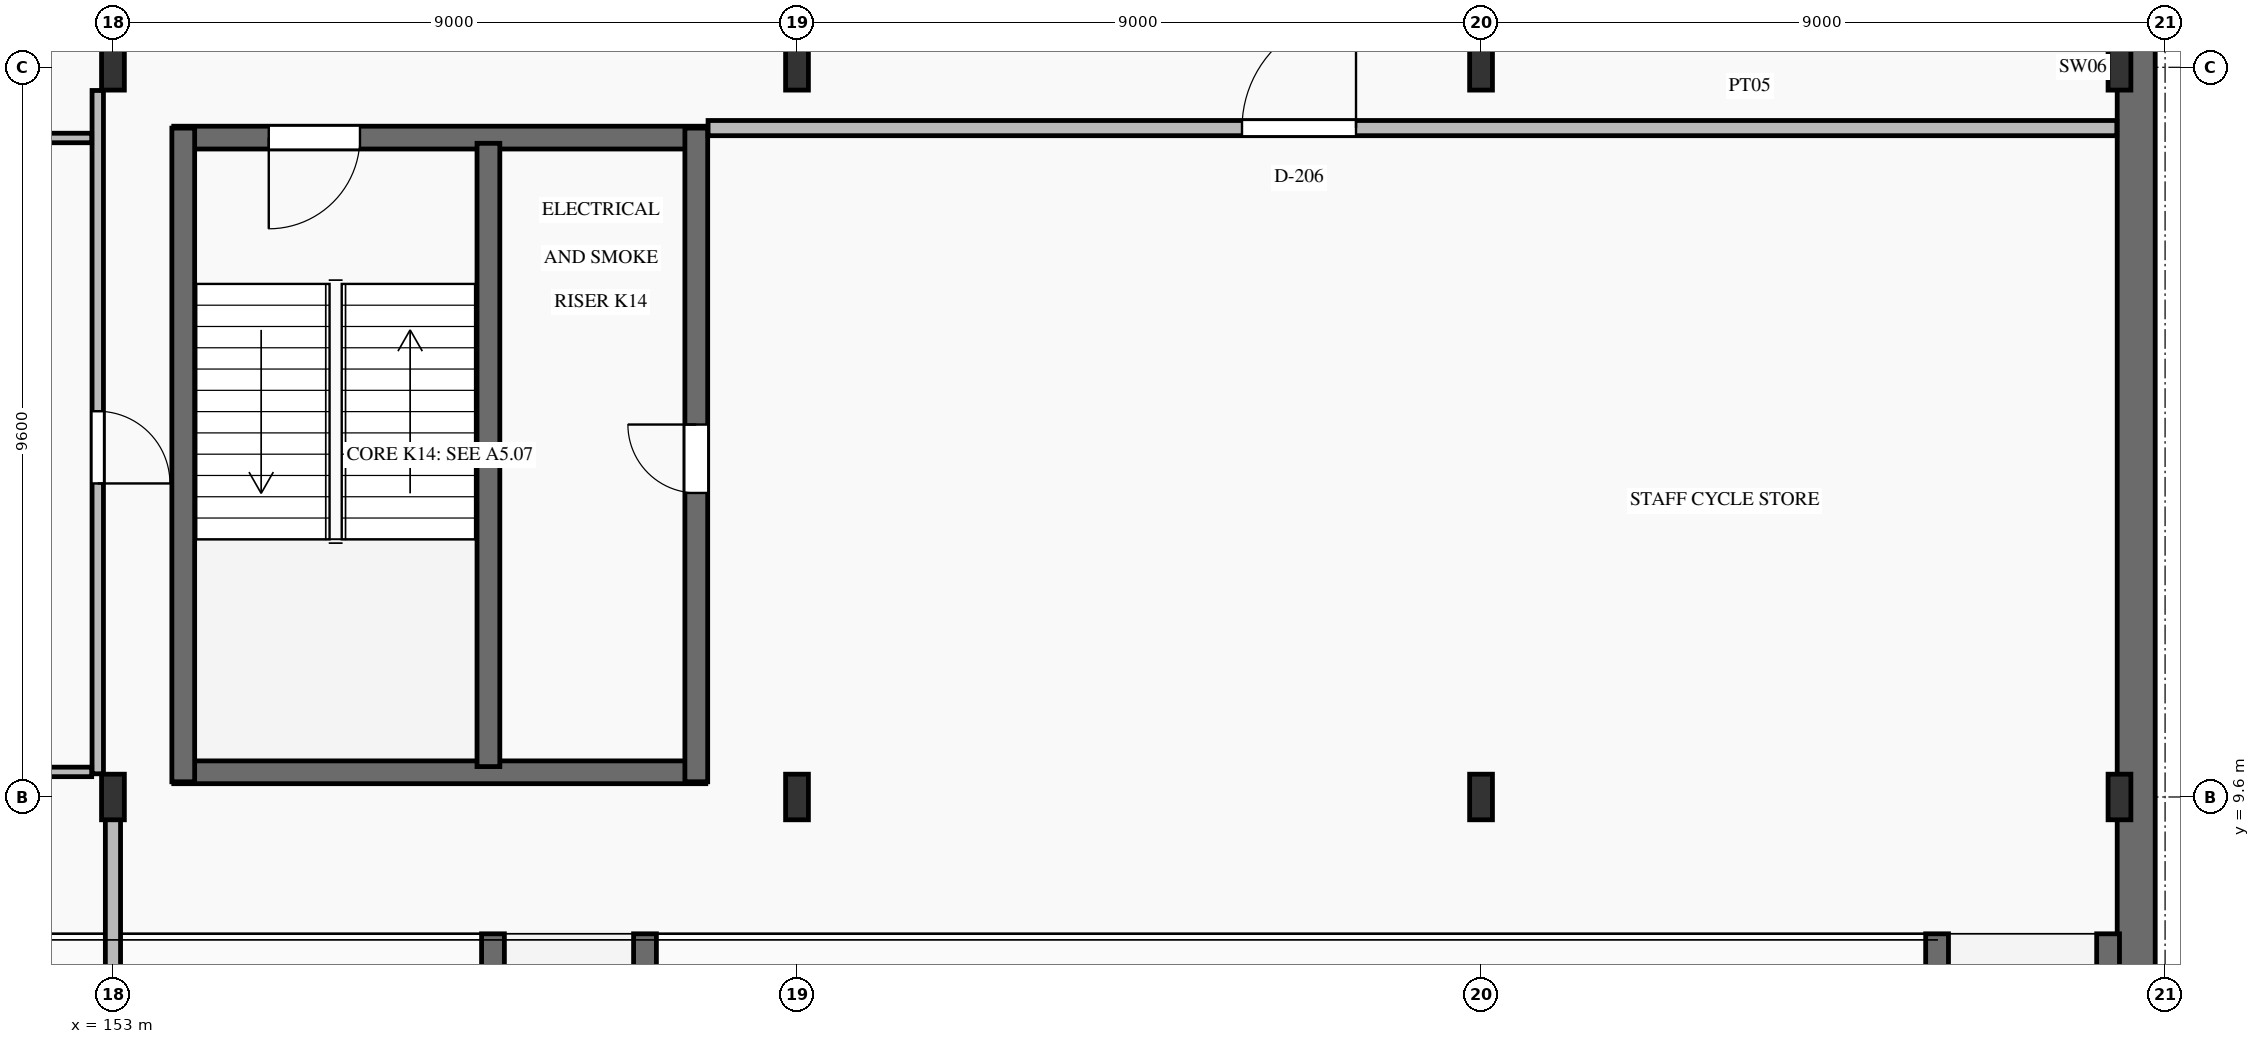
"""IFC4 building model, lengths in metres.
Left out: names, types, materials, properties, quantities, classifications, styles, units other than length and angle.
Written with IfcOpenShell. Run it as: python <this file> out.ifc"""

import sys

from ifc_helpers import new_model, si_unit, direction, frame, frame_2d, origin, origin_2d, place, context, subcontext, project, spatial, rectangle, i_section, extrude, element, fill, save


model = new_model("IFC4")
c1 = context("Model", 3, precision=1e-05, world=origin(), true_north=direction((0.0, 1.0)))
c2 = subcontext(c1, "Body", "Model", "MODEL_VIEW")
j1 = project(units=[si_unit("LENGTHUNIT", "METRE"), si_unit("PLANEANGLEUNIT", "RADIAN")], contexts=[c1])
p1 = place(None, origin())
s1 = spatial("IfcSite", under=j1, at=p1, CompositionType="ELEMENT")
p2 = place(p1, origin())
s2 = spatial("IfcBuilding", under=s1, at=p2, CompositionType="ELEMENT")
p3 = place(p2, frame((0.0, 0.0, -4.5)))
s3 = spatial("IfcBuildingStorey", under=s2, at=p3, CompositionType="ELEMENT", Elevation=-4.5)
for number, where, z_axis, x_axis in (
    (1, (153.0, 9.6, 0.0), (0.0, 0.0, 1.0), (1.0, 0.0, 0.0)),
    (2, (153.0, 19.2, 0.0), (0.0, 0.0, 1.0), (1.0, 0.0, 0.0)),
    (3, (162.0, 9.6, 0.0), (0.0, 0.0, 1.0), (1.0, 0.0, 0.0)),
    (4, (162.0, 19.2, 0.0), (0.0, 0.0, 1.0), (1.0, 0.0, 0.0)),
    (5, (171.0, 9.6, 0.0), (0.0, 0.0, 1.0), (1.0, 0.0, 0.0)),
    (6, (171.0, 19.2, 0.0), (0.0, 0.0, 1.0), (1.0, 0.0, 0.0)),
    (7, (179.4, 9.6, 0.0), (0.0, 0.0, 1.0), (1.0, 0.0, 0.0)),
    (8, (179.4, 19.2, 0.0), (0.0, 0.0, 1.0), (1.0, 0.0, 0.0)),
):
    element("IfcColumn", number, at=place(p3, frame(where, z_axis=z_axis, x_axis=x_axis)), inside=s3, PredefinedType="COLUMN", context=c2, shape_type="SweptSolid", body=[
        extrude(i_section(OverallWidth=0.3, OverallDepth=0.6, WebThickness=0.015, FlangeThickness=0.03, FilletRadius=0.027, at=origin_2d()), origin(), (0.0, 0.0, 1.0), 4.5),
    ])
p4 = place(p3, frame((179.62, 0.22, 0.0), z_axis=(0.0, 0.0, 1.0), x_axis=(0.0, 1.0, 0.0)))
e9 = element("IfcWall", 9, at=p4, inside=s3, PredefinedType="SHEAR", context=c2, shape_type="SweptSolid", body=[
    extrude(rectangle(XDim=37.96, YDim=0.5, at=frame_2d((18.98, 0.0))), origin(), (0.0, 0.0, 1.0), 4.2),
])
p5 = place(p3, frame((153.8, 9.925, 0.0), z_axis=(0.0, 0.0, 1.0), x_axis=(1.0, 0.0, 0.0)))
e10 = element("IfcWall", 10, at=p5, inside=s3, PredefinedType="SHEAR", context=c2, shape_type="SweptSolid", body=[
    extrude(rectangle(XDim=7.0, YDim=0.3, at=frame_2d((3.5, 0.0))), origin(), (0.0, 0.0, 1.0), 4.5),
])
p6 = place(p3, frame((153.8, 18.275, 0.0), z_axis=(0.0, 0.0, 1.0), x_axis=(1.0, 0.0, 0.0)))
e11 = element("IfcWall", 11, at=p6, inside=s3, PredefinedType="SHEAR", context=c2, shape_type="SweptSolid", body=[
    extrude(rectangle(XDim=7.0, YDim=0.3, at=frame_2d((3.5, 0.0))), origin(), (0.0, 0.0, 1.0), 4.5),
])
p7 = place(p6, frame((1.25, 0.0, 0.0)))
e12 = element("IfcOpeningElement", 12, at=p7, cuts=e11, PredefinedType="OPENING", context=c2, shape_type="SweptSolid", body=[
    extrude(rectangle(XDim=1.2, YDim=2.15, at=frame_2d((0.6, 1.075))), frame((0.0, 0.165, 0.0), z_axis=(0.0, -1.0, 0.0), x_axis=(1.0, 0.0, 0.0)), (0.0, 0.0, 1.0), 0.33),
])
p8 = place(p3, frame((153.925, 9.8, 0.0), z_axis=(0.0, 0.0, 1.0), x_axis=(0.0, 1.0, 0.0)))
e13 = element("IfcWall", 13, at=p8, inside=s3, PredefinedType="SHEAR", context=c2, shape_type="SweptSolid", body=[
    extrude(rectangle(XDim=8.6, YDim=0.3, at=frame_2d((4.3, 0.0))), origin(), (0.0, 0.0, 1.0), 4.5),
])
p9 = place(p3, frame((160.675, 9.8, 0.0), z_axis=(0.0, 0.0, 1.0), x_axis=(0.0, 1.0, 0.0)))
e14 = element("IfcWall", 14, at=p9, inside=s3, PredefinedType="SHEAR", context=c2, shape_type="SweptSolid", body=[
    extrude(rectangle(XDim=8.6, YDim=0.3, at=frame_2d((4.3, 0.0))), origin(), (0.0, 0.0, 1.0), 4.5),
])
p10 = place(p9, frame((3.8, 0.0, 0.0)))
e15 = element("IfcOpeningElement", 15, at=p10, cuts=e14, PredefinedType="OPENING", context=c2, shape_type="SweptSolid", body=[
    extrude(rectangle(XDim=0.9, YDim=2.05, at=frame_2d((0.45, 1.025))), frame((0.0, 0.165, 0.0), z_axis=(0.0, -1.0, 0.0), x_axis=(1.0, 0.0, 0.0)), (0.0, 0.0, 1.0), 0.33),
])
p11 = place(p3, frame((157.94, 10.0, 0.0), z_axis=(0.0, 0.0, 1.0), x_axis=(0.0, 1.0, 0.0)))
e16 = element("IfcWall", 16, at=p11, inside=s3, PredefinedType="SHEAR", context=c2, shape_type="SweptSolid", body=[
    extrude(rectangle(XDim=8.2, YDim=0.3, at=frame_2d((4.1, 0.0))), origin(), (0.0, 0.0, 1.0), 4.5),
])
for number, where, z_axis, x_axis in (
    (17, (158.0, 2.2, 0.0), (0.0, 0.0, 1.0), (0.0, 1.0, 0.0)),
    (18, (160.0, 2.2, 0.0), (0.0, 0.0, 1.0), (0.0, 1.0, 0.0)),
):
    element("IfcWall", number, at=place(p3, frame(where, z_axis=z_axis, x_axis=x_axis)), inside=s3, PredefinedType="SHEAR", context=c2, shape_type="SweptSolid", body=[
        extrude(rectangle(XDim=5.6, YDim=0.3, at=frame_2d((2.8, 0.0))), origin(), (0.0, 0.0, 1.0), 1.95),
    ])
for number, where, z_axis, x_axis in (
    (19, (177.0, 2.2, 0.0), (0.0, 0.0, 1.0), (0.0, 1.0, 0.0)),
    (20, (179.25, 2.2, 0.0), (0.0, 0.0, 1.0), (0.0, 1.0, 0.0)),
):
    element("IfcWall", number, at=place(p3, frame(where, z_axis=z_axis, x_axis=x_axis)), inside=s3, PredefinedType="SHEAR", context=c2, shape_type="SweptSolid", body=[
        extrude(rectangle(XDim=5.6, YDim=0.3, at=frame_2d((2.8, 0.0))), origin(), (0.0, 0.0, 1.0), 4.2),
    ])
p12 = place(p3, frame((160.83, 18.4, 0.0), z_axis=(0.0, 0.0, 1.0), x_axis=(1.0, 0.0, 0.0)))
e21 = element("IfcWall", 21, at=p12, inside=s3, PredefinedType="PARTITIONING", context=c2, shape_type="SweptSolid", body=[
    extrude(rectangle(XDim=18.535, YDim=0.2, at=frame_2d((9.268, 0.0))), origin(), (0.0, 0.0, 1.0), 4.2),
])
p13 = place(p12, frame((7.025, 0.0, 0.0)))
e22 = element("IfcOpeningElement", 22, at=p13, cuts=e21, PredefinedType="OPENING", context=c2, shape_type="SweptSolid", body=[
    extrude(rectangle(XDim=1.5, YDim=2.25, at=frame_2d((0.75, 1.125))), frame((0.0, 0.115, 0.0), z_axis=(0.0, -1.0, 0.0), x_axis=(1.0, 0.0, 0.0)), (0.0, 0.0, 1.0), 0.23),
])
p14 = place(p3, frame((152.8, 9.905, 0.0), z_axis=(0.0, 0.0, 1.0), x_axis=(0.0, 1.0, 0.0)))
e23 = element("IfcWall", 23, at=p14, inside=s3, PredefinedType="PARTITIONING", context=c2, shape_type="SweptSolid", body=[
    extrude(rectangle(XDim=8.99, YDim=0.15, at=frame_2d((4.495, 0.0))), origin(), (0.0, 0.0, 1.0), 3.66),
])
p15 = place(p14, frame((3.82, 0.0, 0.0)))
e24 = element("IfcOpeningElement", 24, at=p15, cuts=e23, PredefinedType="OPENING", context=c2, shape_type="SweptSolid", body=[
    extrude(rectangle(XDim=0.95, YDim=2.1, at=frame_2d((0.475, 1.05))), frame((0.0, 0.09, 0.0), z_axis=(0.0, -1.0, 0.0), x_axis=(1.0, 0.0, 0.0)), (0.0, 0.0, 1.0), 0.18),
])
p16 = place(p3, frame((153.0, 0.475, 0.0), z_axis=(0.0, 0.0, 1.0), x_axis=(0.0, 1.0, 0.0)))
e25 = element("IfcWall", 25, at=p16, inside=s3, PredefinedType="PARTITIONING", context=c2, shape_type="SweptSolid", body=[
    extrude(rectangle(XDim=8.875, YDim=0.2, at=frame_2d((4.438, 0.0))), origin(), (0.0, 0.0, 1.0), 4.2),
])
p17 = place(p3, frame((151.84, 18.27, 0.0), z_axis=(0.0, 0.0, 1.0), x_axis=(1.0, 0.0, 0.0)))
e26 = element("IfcWall", 26, at=p17, inside=s3, PredefinedType="PARTITIONING", context=c2, shape_type="SweptSolid", body=[
    extrude(rectangle(XDim=0.88, YDim=0.125, at=frame_2d((0.44, 0.0))), origin(), (0.0, 0.0, 1.0), 4.2),
])
p18 = place(p3, frame((151.84, 9.93, 0.0), z_axis=(0.0, 0.0, 1.0), x_axis=(1.0, 0.0, 0.0)))
e27 = element("IfcWall", 27, at=p18, inside=s3, PredefinedType="PARTITIONING", context=c2, shape_type="SweptSolid", body=[
    extrude(rectangle(XDim=0.88, YDim=0.125, at=frame_2d((0.44, 0.0))), origin(), (0.0, 0.0, 1.0), 3.61),
])
p19 = place(p7, frame((1.2, 0.0, 0.0), z_axis=(0.0, 0.0, 1.0), x_axis=(-1.0, 0.0, 0.0)))
e28 = element("IfcDoor", 28, at=p19, inside=s3, OperationType="SINGLE_SWING_LEFT", PredefinedType="DOOR", context=c2, shape_type="SweptSolid", body=[
    extrude(rectangle(XDim=1.2, YDim=2.15, at=frame_2d((0.6, 1.075))), frame((0.0, 0.025, 0.0), z_axis=(0.0, -1.0, 0.0), x_axis=(1.0, 0.0, 0.0)), (0.0, 0.0, 1.0), 0.05),
])
fill(e12, e28)
p20 = place(p10, origin())
e29 = element("IfcDoor", 29, at=p20, inside=s3, OperationType="SINGLE_SWING_RIGHT", PredefinedType="DOOR", context=c2, shape_type="SweptSolid", body=[
    extrude(rectangle(XDim=0.9, YDim=2.05, at=frame_2d((0.45, 1.025))), frame((0.0, 0.025, 0.0), z_axis=(0.0, -1.0, 0.0), x_axis=(1.0, 0.0, 0.0)), (0.0, 0.0, 1.0), 0.05),
])
fill(e15, e29)
p21 = place(p13, origin())
e30 = element("IfcDoor", 30, at=p21, inside=s3, OperationType="SINGLE_SWING_RIGHT", PredefinedType="DOOR", context=c2, shape_type="SweptSolid", body=[
    extrude(rectangle(XDim=1.5, YDim=2.25, at=frame_2d((0.75, 1.125))), frame((0.0, 0.025, 0.0), z_axis=(0.0, -1.0, 0.0), x_axis=(1.0, 0.0, 0.0)), (0.0, 0.0, 1.0), 0.05),
])
fill(e22, e30)
p22 = place(p15, frame((0.95, 0.0, 0.0), z_axis=(0.0, 0.0, 1.0), x_axis=(-1.0, 0.0, 0.0)))
e31 = element("IfcDoor", 31, at=p22, inside=s3, OperationType="SINGLE_SWING_LEFT", PredefinedType="DOOR", context=c2, shape_type="SweptSolid", body=[
    extrude(rectangle(XDim=0.95, YDim=2.1, at=frame_2d((0.475, 1.05))), frame((0.0, 0.025, 0.0), z_axis=(0.0, -1.0, 0.0), x_axis=(1.0, 0.0, 0.0)), (0.0, 0.0, 1.0), 0.05),
])
fill(e24, e31)
save(model, sys.argv[1])
